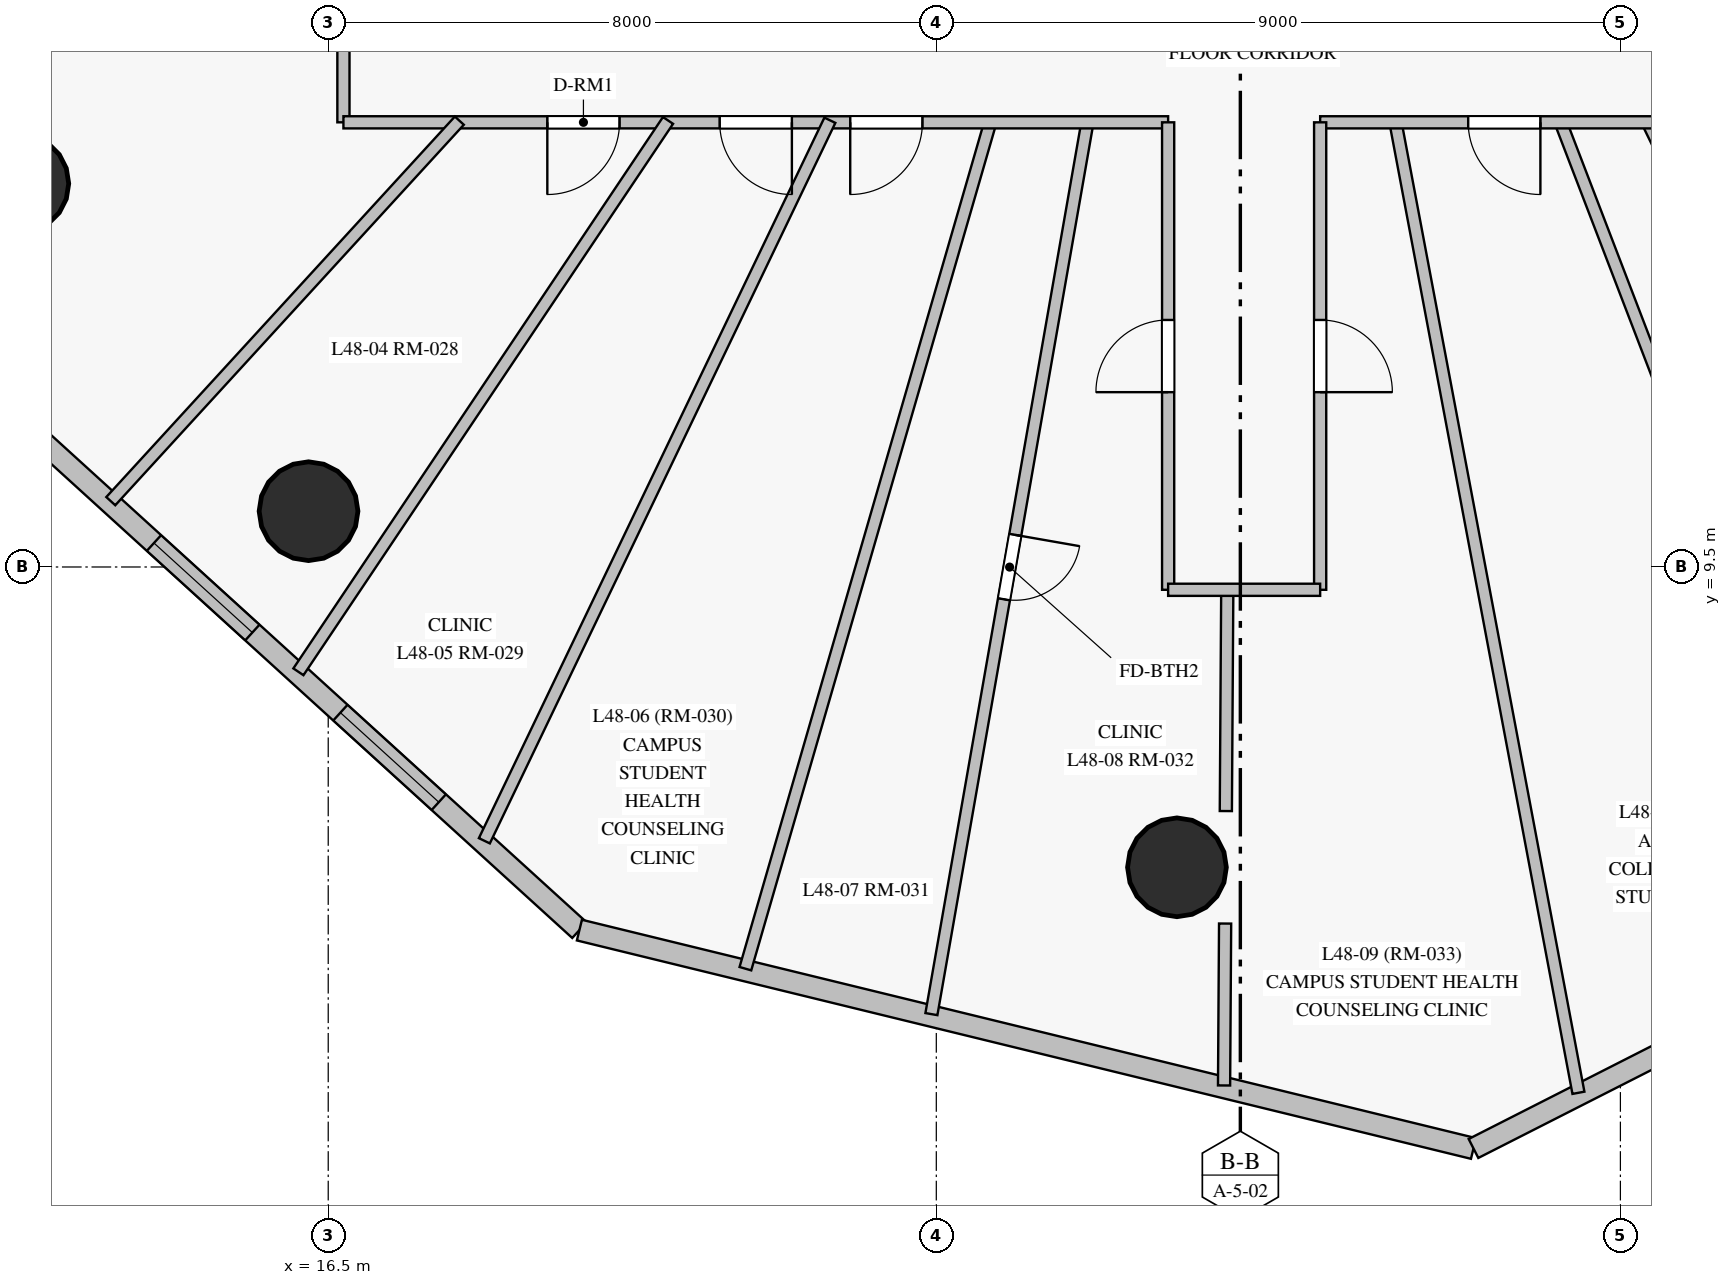
"""IFC4 building model, lengths in metres.
Left out: names, types, materials, properties, quantities, classifications, styles, units other than length and angle.
Written with IfcOpenShell. Run it as: python <this file> out.ifc"""

import sys

from ifc_helpers import new_model, si_unit, direction, frame, frame_2d, origin, origin_with_axes, origin_2d, place, context, subcontext, project, spatial, rectangle, circle, extrude, source, transform, mapped, element, fill, save


model = new_model("IFC4")
c1 = context("Model", 3, precision=1e-05, world=origin(), true_north=direction((0.0, 1.0)))
c2 = subcontext(c1, "Body", "Model", "MODEL_VIEW")
j1 = project(units=[si_unit("LENGTHUNIT", "METRE"), si_unit("PLANEANGLEUNIT", "RADIAN")], contexts=[c1])
p1 = place(None, origin())
s1 = spatial("IfcSite", under=j1, at=p1, CompositionType="ELEMENT")
p2 = place(p1, origin())
s2 = spatial("IfcBuilding", under=s1, at=p2, CompositionType="ELEMENT")
p3 = place(p2, frame((0.0, 0.0, 168.75)))
s3 = spatial("IfcBuildingStorey", under=s2, at=p3, CompositionType="ELEMENT", Elevation=168.75)
m1 = source(origin_with_axes(), c2, "Body", "SweptSolid", [
    extrude(circle(Radius=0.65, at=origin_2d()), origin(), (0.0, 0.0, 1.0), 3.05),
])
for number, where, z_axis, x_axis in (
    (1, (12.436, 14.544, 0.0), (0.0, 0.0, 1.0), (1.0, 0.0, 0.0)),
    (2, (16.241, 10.234, 0.0), (0.0, 0.0, 1.0), (1.0, 0.0, 0.0)),
    (3, (27.666, 5.549, 0.0), (0.0, 0.0, 1.0), (1.0, 0.0, 0.0)),
):
    element("IfcColumn", number, at=place(p3, frame(where, z_axis=z_axis, x_axis=x_axis)), inside=s3, PredefinedType="COLUMN", context=c2, shape_type="MappedRepresentation", body=[
        mapped(m1, transform((0.0, 0.0, 0.0), scale=1.0)),
    ])
p4 = place(p3, frame((12.692, 11.194, 0.0), z_axis=(0.0, 0.0, 1.0), x_axis=(0.739668886852, -0.67297097844, 0.0)))
e4 = element("IfcWall", 4, at=p4, inside=s3, PredefinedType="SOLIDWALL", context=c2, shape_type="SweptSolid", body=[
    extrude(rectangle(XDim=9.616, YDim=0.28, at=frame_2d((4.808, 0.0))), origin(), (0.0, 0.0, 1.0), 2.825),
])
p5 = place(p4, frame((2.049, 0.0, 0.85)))
e5 = element("IfcOpeningElement", 5, at=p5, cuts=e4, PredefinedType="OPENING", context=c2, shape_type="SweptSolid", body=[
    extrude(rectangle(XDim=1.75, YDim=1.65, at=frame_2d((0.875, 0.825))), frame((0.0, 0.15, 0.0), z_axis=(0.0, -1.0, 0.0), x_axis=(1.0, 0.0, 0.0)), (0.0, 0.0, 1.0), 0.3),
])
p6 = place(p4, frame((5.365, 0.0, 0.85)))
e6 = element("IfcOpeningElement", 6, at=p6, cuts=e4, PredefinedType="OPENING", context=c2, shape_type="SweptSolid", body=[
    extrude(rectangle(XDim=1.75, YDim=1.65, at=frame_2d((0.875, 0.825))), frame((0.0, 0.15, 0.0), z_axis=(0.0, -1.0, 0.0), x_axis=(1.0, 0.0, 0.0)), (0.0, 0.0, 1.0), 0.3),
])
p7 = place(p3, frame((19.805, 4.723, 0.0), z_axis=(0.0, 0.0, 1.0), x_axis=(0.971447044885, -0.237256483544, 0.0)))
e7 = element("IfcWall", 7, at=p7, inside=s3, PredefinedType="SOLIDWALL", context=c2, shape_type="SweptSolid", body=[
    extrude(rectangle(XDim=12.108, YDim=0.28, at=frame_2d((6.054, 0.0))), origin(), (0.0, 0.0, 1.0), 2.495),
])
p8 = place(p3, frame((31.567, 1.85, 0.0), z_axis=(0.0, 0.0, 1.0), x_axis=(0.891507758559, 0.453005426491, 0.0)))
e8 = element("IfcWall", 8, at=p8, inside=s3, PredefinedType="SOLIDWALL", context=c2, shape_type="SweptSolid", body=[
    extrude(rectangle(XDim=9.595, YDim=0.28, at=frame_2d((4.798, 0.0))), origin(), (0.0, 0.0, 1.0), 2.825),
])
p9 = place(p8, frame((2.884, 0.0, 0.85)))
e9 = element("IfcOpeningElement", 9, at=p9, cuts=e8, PredefinedType="OPENING", context=c2, shape_type="SweptSolid", body=[
    extrude(rectangle(XDim=1.75, YDim=1.65, at=frame_2d((0.875, 0.825))), frame((0.0, 0.15, 0.0), z_axis=(0.0, -1.0, 0.0), x_axis=(1.0, 0.0, 0.0)), (0.0, 0.0, 1.0), 0.3),
])
p10 = place(p8, frame((6.484, 0.0, 0.85)))
e10 = element("IfcOpeningElement", 10, at=p10, cuts=e8, PredefinedType="OPENING", context=c2, shape_type="SweptSolid", body=[
    extrude(rectangle(XDim=0.95, YDim=1.5, at=frame_2d((0.475, 0.75))), frame((0.0, 0.15, 0.0), z_axis=(0.0, -1.0, 0.0), x_axis=(1.0, 0.0, 0.0)), (0.0, 0.0, 1.0), 0.3),
])
p11 = place(p3, frame((16.7, 15.35, 0.0), z_axis=(0.0, 0.0, 1.0), x_axis=(0.0, 1.0, 0.0)))
e11 = element("IfcWall", 11, at=p11, inside=s3, PredefinedType="PARTITIONING", context=c2, shape_type="SweptSolid", body=[
    extrude(rectangle(XDim=22.3, YDim=0.16, at=frame_2d((11.15, 0.0))), origin(), (0.0, 0.0, 1.0), 2.275),
])
p12 = place(p11, frame((11.383, 0.0, 0.0)))
e12 = element("IfcOpeningElement", 12, at=p12, cuts=e11, PredefinedType="OPENING", context=c2, shape_type="SweptSolid", body=[
    extrude(rectangle(XDim=0.86, YDim=2.1, at=frame_2d((0.43, 1.05))), frame((0.0, 0.09, 0.0), z_axis=(0.0, -1.0, 0.0), x_axis=(1.0, 0.0, 0.0)), (0.0, 0.0, 1.0), 0.18),
])
p13 = place(p11, frame((7.33, 0.0, 0.0)))
e13 = element("IfcOpeningElement", 13, at=p13, cuts=e11, PredefinedType="OPENING", context=c2, shape_type="SweptSolid", body=[
    extrude(rectangle(XDim=0.96, YDim=2.15, at=frame_2d((0.48, 1.075))), frame((0.0, 0.09, 0.0), z_axis=(0.0, -1.0, 0.0), x_axis=(1.0, 0.0, 0.0)), (0.0, 0.0, 1.0), 0.18),
])
p14 = place(p11, frame((4.61, 0.0, 0.0)))
e14 = element("IfcOpeningElement", 14, at=p14, cuts=e11, PredefinedType="OPENING", context=c2, shape_type="SweptSolid", body=[
    extrude(rectangle(XDim=0.95, YDim=2.15, at=frame_2d((0.475, 1.075))), frame((0.0, 0.09, 0.0), z_axis=(0.0, -1.0, 0.0), x_axis=(1.0, 0.0, 0.0)), (0.0, 0.0, 1.0), 0.18),
])
p15 = place(p11, frame((16.99, 0.0, 0.0)))
e15 = element("IfcOpeningElement", 15, at=p15, cuts=e11, PredefinedType="OPENING", context=c2, shape_type="SweptSolid", body=[
    extrude(rectangle(XDim=0.95, YDim=2.15, at=frame_2d((0.475, 1.075))), frame((0.0, 0.09, 0.0), z_axis=(0.0, -1.0, 0.0), x_axis=(1.0, 0.0, 0.0)), (0.0, 0.0, 1.0), 0.18),
])
p16 = place(p11, frame((15.86, 0.0, 0.0)))
e16 = element("IfcOpeningElement", 16, at=p16, cuts=e11, PredefinedType="OPENING", context=c2, shape_type="SweptSolid", body=[
    extrude(rectangle(XDim=0.95, YDim=2.15, at=frame_2d((0.475, 1.075))), frame((0.0, 0.09, 0.0), z_axis=(0.0, -1.0, 0.0), x_axis=(1.0, 0.0, 0.0)), (0.0, 0.0, 1.0), 0.18),
])
p17 = place(p11, frame((14.02, 0.0, 0.0)))
e17 = element("IfcOpeningElement", 17, at=p17, cuts=e11, PredefinedType="OPENING", context=c2, shape_type="SweptSolid", body=[
    extrude(rectangle(XDim=0.95, YDim=2.15, at=frame_2d((0.475, 1.075))), frame((0.0, 0.09, 0.0), z_axis=(0.0, -1.0, 0.0), x_axis=(1.0, 0.0, 0.0)), (0.0, 0.0, 1.0), 0.18),
])
p18 = place(p3, frame((30.535, 15.379, 0.0), z_axis=(0.0, 0.0, 1.0), x_axis=(0.185266445882, -0.982688324969, 0.0)))
e18 = element("IfcWall", 18, at=p18, inside=s3, PredefinedType="PARTITIONING", context=c2, shape_type="SweptSolid", body=[
    extrude(rectangle(XDim=13.022, YDim=0.16, at=frame_2d((6.511, 0.0))), origin(), (0.0, 0.0, 1.0), 2.825),
])
p19 = place(p3, frame((26.493, 15.38, 0.0), z_axis=(0.0, 0.0, 1.0), x_axis=(-0.172341150269, -0.985037323112, 0.0)))
e19 = element("IfcWall", 19, at=p19, inside=s3, PredefinedType="PARTITIONING", context=c2, shape_type="SweptSolid", body=[
    extrude(rectangle(XDim=11.941, YDim=0.16, at=frame_2d((5.97, 0.0))), origin(), (0.0, 0.0, 1.0), 2.275),
])
p20 = place(p19, frame((5.54, 0.0, 0.0)))
e20 = element("IfcOpeningElement", 20, at=p20, cuts=e19, PredefinedType="OPENING", context=c2, shape_type="SweptSolid", body=[
    extrude(rectangle(XDim=0.86, YDim=2.04, at=frame_2d((0.43, 1.02))), frame((0.0, 0.09, 0.0), z_axis=(0.0, -1.0, 0.0), x_axis=(1.0, 0.0, 0.0)), (0.0, 0.0, 1.0), 0.18),
])
p21 = place(p3, frame((25.219, 15.379, 0.0), z_axis=(0.0, 0.0, 1.0), x_axis=(-0.277990744835, -0.960583752614, 0.0)))
e21 = element("IfcWall", 21, at=p21, inside=s3, PredefinedType="PARTITIONING", context=c2, shape_type="SweptSolid", body=[
    extrude(rectangle(XDim=11.622, YDim=0.16, at=frame_2d((5.811, 0.0))), origin(), (0.0, 0.0, 1.0), 2.825),
])
p22 = place(p3, frame((32.704, 15.378, 0.0), z_axis=(0.0, 0.0, 1.0), x_axis=(0.358255772145, -0.933623479634, 0.0)))
e22 = element("IfcWall", 22, at=p22, inside=s3, PredefinedType="PARTITIONING", context=c2, shape_type="SweptSolid", body=[
    extrude(rectangle(XDim=11.582, YDim=0.16, at=frame_2d((5.791, 0.0))), origin(), (0.0, 0.0, 1.0), 2.825),
])
p23 = place(p22, frame((5.361, 0.0, 0.0)))
e23 = element("IfcOpeningElement", 23, at=p23, cuts=e22, PredefinedType="OPENING", context=c2, shape_type="SweptSolid", body=[
    extrude(rectangle(XDim=0.86, YDim=2.04, at=frame_2d((0.43, 1.02))), frame((0.0, 0.09, 0.0), z_axis=(0.0, -1.0, 0.0), x_axis=(1.0, 0.0, 0.0)), (0.0, 0.0, 1.0), 0.18),
])
p24 = place(p3, frame((33.847, 15.377, 0.0), z_axis=(0.0, 0.0, 1.0), x_axis=(0.437647071578, -0.899146840477, 0.0)))
e24 = element("IfcWall", 24, at=p24, inside=s3, PredefinedType="PARTITIONING", context=c2, shape_type="SweptSolid", body=[
    extrude(rectangle(XDim=11.003, YDim=0.16, at=frame_2d((5.501, 0.0))), origin(), (0.0, 0.0, 1.0), 2.825),
])
p25 = place(p3, frame((27.55, 15.35, 0.0), z_axis=(0.0, 0.0, 1.0), x_axis=(-1.0, 0.0, 0.0)))
e25 = element("IfcWall", 25, at=p25, inside=s3, PredefinedType="PARTITIONING", context=c2, shape_type="SweptSolid", body=[
    extrude(rectangle(XDim=10.85, YDim=0.16, at=frame_2d((5.425, 0.0))), origin(), (0.0, 0.0, 1.0), 2.375),
])
p26 = place(p25, frame((7.218, 0.0, 0.0)))
e26 = element("IfcOpeningElement", 26, at=p26, cuts=e25, PredefinedType="OPENING", context=c2, shape_type="SweptSolid", body=[
    extrude(rectangle(XDim=0.95, YDim=2.15, at=frame_2d((0.475, 1.075))), frame((0.0, 0.09, 0.0), z_axis=(0.0, -1.0, 0.0), x_axis=(1.0, 0.0, 0.0)), (0.0, 0.0, 1.0), 0.18),
])
p27 = place(p25, frame((4.95, 0.0, 0.0)))
e27 = element("IfcOpeningElement", 27, at=p27, cuts=e25, PredefinedType="OPENING", context=c2, shape_type="SweptSolid", body=[
    extrude(rectangle(XDim=0.95, YDim=2.15, at=frame_2d((0.475, 1.075))), frame((0.0, 0.09, 0.0), z_axis=(0.0, -1.0, 0.0), x_axis=(1.0, 0.0, 0.0)), (0.0, 0.0, 1.0), 0.18),
])
p28 = place(p25, frame((3.232, 0.0, 0.0)))
e28 = element("IfcOpeningElement", 28, at=p28, cuts=e25, PredefinedType="OPENING", context=c2, shape_type="SweptSolid", body=[
    extrude(rectangle(XDim=0.95, YDim=2.15, at=frame_2d((0.475, 1.075))), frame((0.0, 0.09, 0.0), z_axis=(0.0, -1.0, 0.0), x_axis=(1.0, 0.0, 0.0)), (0.0, 0.0, 1.0), 0.18),
])
p29 = place(p3, frame((40.2, 15.35, 0.0), z_axis=(0.0, 0.0, 1.0), x_axis=(-1.0, 0.0, 0.0)))
e29 = element("IfcWall", 29, at=p29, inside=s3, PredefinedType="PARTITIONING", context=c2, shape_type="SweptSolid", body=[
    extrude(rectangle(XDim=10.65, YDim=0.16, at=frame_2d((5.325, 0.0))), origin(), (0.0, 0.0, 1.0), 2.275),
])
p30 = place(p29, frame((7.752, 0.0, 0.0)))
e30 = element("IfcOpeningElement", 30, at=p30, cuts=e29, PredefinedType="OPENING", context=c2, shape_type="SweptSolid", body=[
    extrude(rectangle(XDim=0.95, YDim=2.15, at=frame_2d((0.475, 1.075))), frame((0.0, 0.09, 0.0), z_axis=(0.0, -1.0, 0.0), x_axis=(1.0, 0.0, 0.0)), (0.0, 0.0, 1.0), 0.18),
])
p31 = place(p29, frame((4.958, 0.0, 0.0)))
e31 = element("IfcOpeningElement", 31, at=p31, cuts=e29, PredefinedType="OPENING", context=c2, shape_type="SweptSolid", body=[
    extrude(rectangle(XDim=0.95, YDim=2.15, at=frame_2d((0.475, 1.075))), frame((0.0, 0.09, 0.0), z_axis=(0.0, -1.0, 0.0), x_axis=(1.0, 0.0, 0.0)), (0.0, 0.0, 1.0), 0.18),
])
p32 = place(p29, frame((2.66, 0.0, 0.0)))
e32 = element("IfcOpeningElement", 32, at=p32, cuts=e29, PredefinedType="OPENING", context=c2, shape_type="SweptSolid", body=[
    extrude(rectangle(XDim=0.95, YDim=2.15, at=frame_2d((0.475, 1.075))), frame((0.0, 0.09, 0.0), z_axis=(0.0, -1.0, 0.0), x_axis=(1.0, 0.0, 0.0)), (0.0, 0.0, 1.0), 0.18),
])
p33 = place(p29, frame((1.562, 0.0, 0.0)))
e33 = element("IfcOpeningElement", 33, at=p33, cuts=e29, PredefinedType="OPENING", context=c2, shape_type="SweptSolid", body=[
    extrude(rectangle(XDim=0.95, YDim=2.15, at=frame_2d((0.475, 1.075))), frame((0.0, 0.09, 0.0), z_axis=(0.0, -1.0, 0.0), x_axis=(1.0, 0.0, 0.0)), (0.0, 0.0, 1.0), 0.18),
])
p34 = place(p3, frame((23.1, 15.377, 0.0), z_axis=(0.0, 0.0, 1.0), x_axis=(-0.432373169731, -0.901694761045, 0.0)))
e34 = element("IfcWall", 34, at=p34, inside=s3, PredefinedType="PARTITIONING", context=c2, shape_type="SweptSolid", body=[
    extrude(rectangle(XDim=10.513, YDim=0.16, at=frame_2d((5.256, 0.0))), origin(), (0.0, 0.0, 1.0), 2.825),
])
p35 = place(p3, frame((20.97, 15.375, 0.0), z_axis=(0.0, 0.0, 1.0), x_axis=(-0.556788758436, -0.830654126866, 0.0)))
e35 = element("IfcWall", 35, at=p35, inside=s3, PredefinedType="PARTITIONING", context=c2, shape_type="SweptSolid", body=[
    extrude(rectangle(XDim=8.733, YDim=0.16, at=frame_2d((4.366, 0.0))), origin(), (0.0, 0.0, 1.0), 2.825),
])
p36 = place(p3, frame((18.225, 15.372, 0.0), z_axis=(0.0, 0.0, 1.0), x_axis=(-0.675483575818, -0.737375032667, 0.0)))
e36 = element("IfcWall", 36, at=p36, inside=s3, PredefinedType="PARTITIONING", context=c2, shape_type="SweptSolid", body=[
    extrude(rectangle(XDim=6.789, YDim=0.16, at=frame_2d((3.395, 0.0))), origin(), (0.0, 0.0, 1.0), 2.275),
])
p37 = place(p3, frame((29.55, 15.35, 0.0), z_axis=(0.0, 0.0, 1.0), x_axis=(0.0, -1.0, 0.0)))
e37 = element("IfcWall", 37, at=p37, inside=s3, PredefinedType="PARTITIONING", context=c2, shape_type="SweptSolid", body=[
    extrude(rectangle(XDim=6.15, YDim=0.16, at=frame_2d((3.075, 0.0))), origin(), (0.0, 0.0, 1.0), 2.825),
])
p38 = place(p37, frame((2.6, 0.0, 0.0)))
e38 = element("IfcOpeningElement", 38, at=p38, cuts=e37, PredefinedType="OPENING", context=c2, shape_type="SweptSolid", body=[
    extrude(rectangle(XDim=0.95, YDim=2.15, at=frame_2d((0.475, 1.075))), frame((0.0, 0.09, 0.0), z_axis=(0.0, -1.0, 0.0), x_axis=(1.0, 0.0, 0.0)), (0.0, 0.0, 1.0), 0.18),
])
p39 = place(p3, frame((27.55, 9.2, 0.0), z_axis=(0.0, 0.0, 1.0), x_axis=(0.0, 1.0, 0.0)))
e39 = element("IfcWall", 39, at=p39, inside=s3, PredefinedType="PARTITIONING", context=c2, shape_type="SweptSolid", body=[
    extrude(rectangle(XDim=6.15, YDim=0.16, at=frame_2d((3.075, 0.0))), origin(), (0.0, 0.0, 1.0), 2.275),
])
p40 = place(p39, frame((2.6, 0.0, 0.0)))
e40 = element("IfcOpeningElement", 40, at=p40, cuts=e39, PredefinedType="OPENING", context=c2, shape_type="SweptSolid", body=[
    extrude(rectangle(XDim=0.95, YDim=2.15, at=frame_2d((0.475, 1.075))), frame((0.0, 0.09, 0.0), z_axis=(0.0, -1.0, 0.0), x_axis=(1.0, 0.0, 0.0)), (0.0, 0.0, 1.0), 0.18),
])
p41 = place(p3, frame((28.328, 9.23, 0.0), z_axis=(0.0, 0.0, 1.0), x_axis=(-0.006475042741, -0.999979036691, 0.0)))
e41 = element("IfcWall", 41, at=p41, inside=s3, PredefinedType="PARTITIONING", context=c2, shape_type="SweptSolid", body=[
    extrude(rectangle(XDim=2.941, YDim=0.16, at=frame_2d((1.47, 0.0))), origin(), (0.0, 0.0, 1.0), 2.825),
])
p42 = place(p3, frame((28.3, 4.809, 0.0), z_axis=(0.0, 0.0, 1.0), x_axis=(-0.006532811882, -0.999978660957, 0.0)))
e42 = element("IfcWall", 42, at=p42, inside=s3, PredefinedType="PARTITIONING", context=c2, shape_type="SweptSolid", body=[
    extrude(rectangle(XDim=2.13, YDim=0.16, at=frame_2d((1.065, 0.0))), origin(), (0.0, 0.0, 1.0), 2.495),
])
p43 = place(p3, frame((29.55, 9.2, 0.0), z_axis=(0.0, 0.0, 1.0), x_axis=(-1.0, 0.0, 0.0)))
e43 = element("IfcWall", 43, at=p43, inside=s3, PredefinedType="PARTITIONING", context=c2, shape_type="SweptSolid", body=[
    extrude(rectangle(XDim=2.0, YDim=0.16, at=frame_2d((1.0, 0.0))), origin(), (0.0, 0.0, 1.0), 2.495),
])
m2 = source(origin_with_axes(), c2, "Body", "SweptSolid", [
    extrude(rectangle(XDim=1.75, YDim=1.65, at=frame_2d((0.875, 0.825))), frame((0.0, 0.03, 0.0), z_axis=(0.0, -1.0, 0.0), x_axis=(1.0, 0.0, 0.0)), (0.0, 0.0, 1.0), 0.06),
])
p44 = place(p5, origin())
e44 = element("IfcWindow", 44, at=p44, inside=s3, PartitioningType="SINGLE_PANEL", PredefinedType="WINDOW", context=c2, shape_type="MappedRepresentation", body=[
    mapped(m2, transform((0.0, 0.0, 0.0), scale=1.0)),
])
fill(e5, e44)
p45 = place(p6, origin())
e45 = element("IfcWindow", 45, at=p45, inside=s3, PartitioningType="SINGLE_PANEL", PredefinedType="WINDOW", context=c2, shape_type="MappedRepresentation", body=[
    mapped(m2, transform((0.0, 0.0, 0.0), scale=1.0)),
])
fill(e6, e45)
m3 = source(origin_with_axes(), c2, "Body", "SweptSolid", [
    extrude(rectangle(XDim=0.95, YDim=2.15, at=frame_2d((0.475, 1.075))), frame((0.0, 0.025, 0.0), z_axis=(0.0, -1.0, 0.0), x_axis=(1.0, 0.0, 0.0)), (0.0, 0.0, 1.0), 0.05),
])
p46 = place(p26, origin())
e46 = element("IfcDoor", 46, at=p46, inside=s3, OperationType="SINGLE_SWING_RIGHT", PredefinedType="DOOR", context=c2, shape_type="MappedRepresentation", body=[
    mapped(m3, transform((0.0, 0.0, 0.0), scale=1.0)),
])
fill(e26, e46)
p47 = place(p27, origin())
e47 = element("IfcDoor", 47, at=p47, inside=s3, OperationType="SINGLE_SWING_LEFT", PredefinedType="DOOR", context=c2, shape_type="MappedRepresentation", body=[
    mapped(m3, transform((0.0, 0.0, 0.0), scale=1.0)),
])
fill(e27, e47)
p48 = place(p28, origin())
e48 = element("IfcDoor", 48, at=p48, inside=s3, OperationType="SINGLE_SWING_RIGHT", PredefinedType="DOOR", context=c2, shape_type="MappedRepresentation", body=[
    mapped(m3, transform((0.0, 0.0, 0.0), scale=1.0)),
])
fill(e28, e48)
p49 = place(p40, origin())
e49 = element("IfcDoor", 49, at=p49, inside=s3, OperationType="SINGLE_SWING_LEFT", PredefinedType="DOOR", context=c2, shape_type="MappedRepresentation", body=[
    mapped(m3, transform((0.0, 0.0, 0.0), scale=1.0)),
])
fill(e40, e49)
p50 = place(p38, origin())
e50 = element("IfcDoor", 50, at=p50, inside=s3, OperationType="SINGLE_SWING_RIGHT", PredefinedType="DOOR", context=c2, shape_type="MappedRepresentation", body=[
    mapped(m3, transform((0.0, 0.0, 0.0), scale=1.0)),
])
fill(e38, e50)
p51 = place(p30, origin())
e51 = element("IfcDoor", 51, at=p51, inside=s3, OperationType="SINGLE_SWING_LEFT", PredefinedType="DOOR", context=c2, shape_type="MappedRepresentation", body=[
    mapped(m3, transform((0.0, 0.0, 0.0), scale=1.0)),
])
fill(e30, e51)
m4 = source(origin_with_axes(), c2, "Body", "SweptSolid", [
    extrude(rectangle(XDim=0.86, YDim=2.04, at=frame_2d((0.43, 1.02))), frame((0.0, 0.025, 0.0), z_axis=(0.0, -1.0, 0.0), x_axis=(1.0, 0.0, 0.0)), (0.0, 0.0, 1.0), 0.05),
])
p52 = place(p20, origin())
e52 = element("IfcDoor", 52, at=p52, inside=s3, OperationType="SINGLE_SWING_LEFT", PredefinedType="DOOR", context=c2, shape_type="MappedRepresentation", body=[
    mapped(m4, transform((0.0, 0.0, 0.0), scale=1.0)),
])
fill(e20, e52)
save(model, sys.argv[1])
